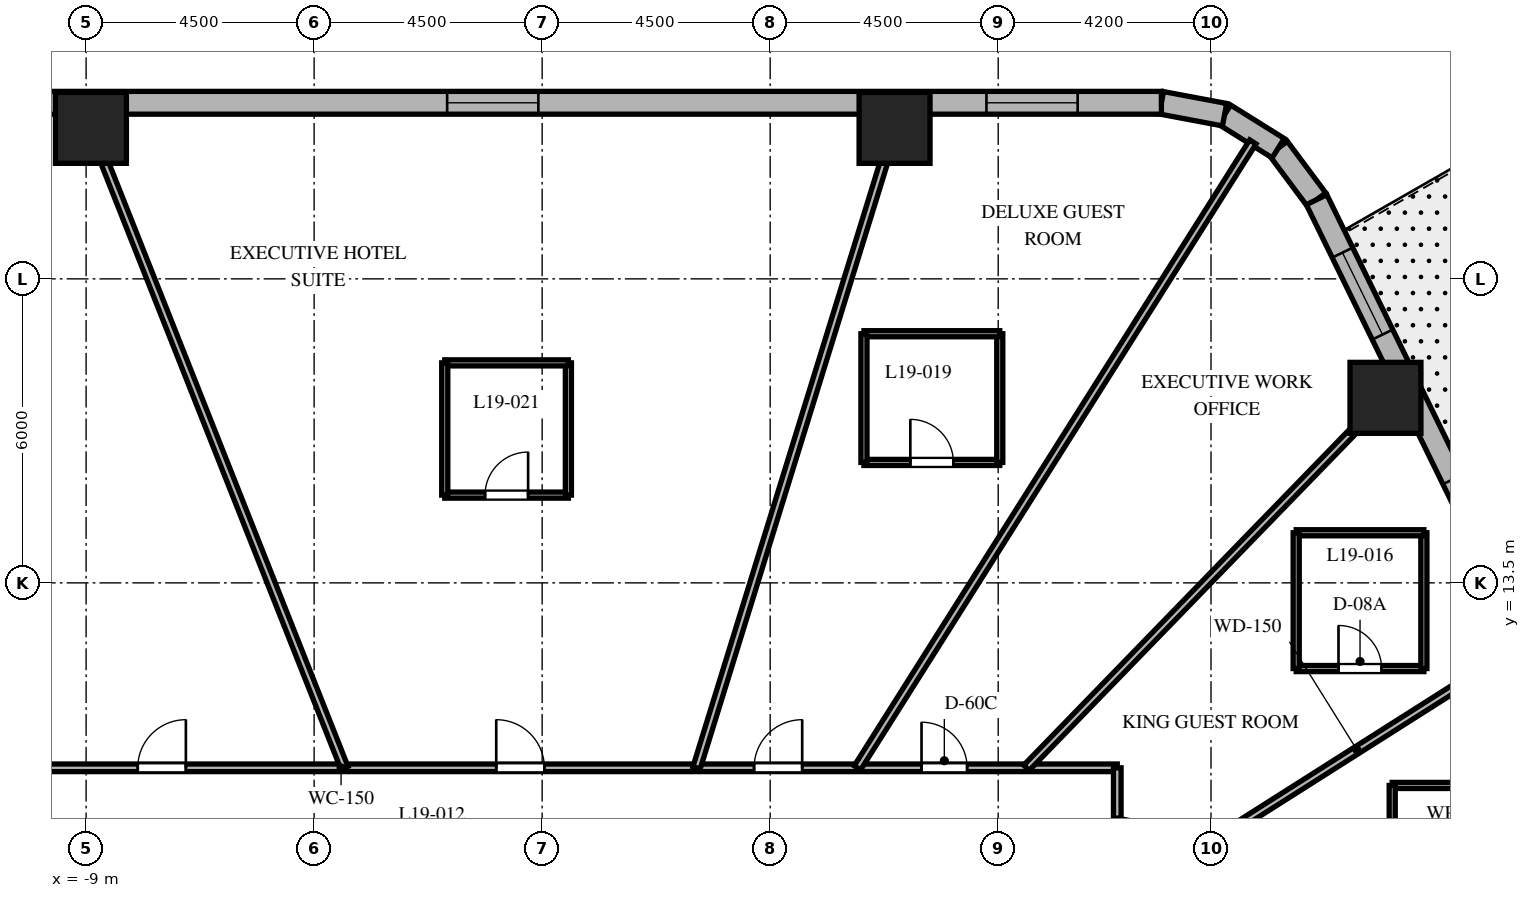
"""IFC4 building model, lengths in metres.
Left out: names, types, materials, properties, quantities, classifications, styles, units other than length and angle.
Written with IfcOpenShell. Run it as: python <this file> out.ifc"""

import sys

from ifc_helpers import new_model, si_unit, direction, frame, frame_2d, origin, origin_2d, place, context, subcontext, project, spatial, rectangle, extrude, element, fill, save


model = new_model("IFC4")
c1 = context("Model", 3, precision=1e-05, world=origin(), true_north=direction((0.0, 1.0)))
c2 = subcontext(c1, "Body", "Model", "MODEL_VIEW")
j1 = project(units=[si_unit("LENGTHUNIT", "METRE"), si_unit("PLANEANGLEUNIT", "RADIAN")], contexts=[c1])
p1 = place(None, origin())
s1 = spatial("IfcSite", under=j1, at=p1, CompositionType="ELEMENT")
p2 = place(p1, origin())
s2 = spatial("IfcBuilding", under=s1, at=p2, CompositionType="ELEMENT")
p3 = place(p2, frame((0.0, 0.0, 82.3)))
s3 = spatial("IfcBuildingStorey", under=s2, at=p3, CompositionType="ELEMENT", Elevation=82.3)
for number, where, z_axis, x_axis in (
    (1, (16.643, 17.152, 0.0), (0.0, 0.0, 1.0), (1.0, 0.0, 0.0)),
    (2, (6.955, 22.48, 0.0), (0.0, 0.0, 1.0), (1.0, 0.0, 0.0)),
    (3, (-8.905, 22.48, 0.0), (0.0, 0.0, 1.0), (1.0, 0.0, 0.0)),
):
    element("IfcColumn", number, at=place(p3, frame(where, z_axis=z_axis, x_axis=x_axis)), inside=s3, PredefinedType="COLUMN", context=c2, shape_type="SweptSolid", body=[
        extrude(rectangle(XDim=1.4, YDim=1.4, at=origin_2d()), origin(), (0.0, 0.0, 1.0), 3.7),
    ])
p4 = place(p3, frame((15.284, 21.062, 0.0), z_axis=(0.0, 0.0, 1.0), x_axis=(-0.597595366449, 0.801797841104, 0.0)))
e4 = element("IfcWall", 4, at=p4, inside=s3, PredefinedType="SOLIDWALL", context=c2, shape_type="SweptSolid", body=[
    extrude(rectangle(XDim=1.269, YDim=0.45, at=frame_2d((0.634, 0.0))), origin(), (0.0, 0.0, 1.0), 3.38),
])
p5 = place(p3, frame((14.526, 22.08, 0.0), z_axis=(0.0, 0.0, 1.0), x_axis=(-0.848185203596, 0.529699783275, 0.0)))
e5 = element("IfcWall", 5, at=p5, inside=s3, PredefinedType="SOLIDWALL", context=c2, shape_type="SweptSolid", body=[
    extrude(rectangle(XDim=1.247, YDim=0.45, at=frame_2d((0.624, 0.0))), origin(), (0.0, 0.0, 1.0), 3.38),
])
p6 = place(p3, frame((13.468, 22.74, 0.0), z_axis=(0.0, 0.0, 1.0), x_axis=(-0.982717174228, 0.185113358451, 0.0)))
e6 = element("IfcWall", 6, at=p6, inside=s3, PredefinedType="SOLIDWALL", context=c2, shape_type="SweptSolid", body=[
    extrude(rectangle(XDim=1.269, YDim=0.45, at=frame_2d((0.634, 0.0))), origin(), (0.0, 0.0, 1.0), 3.38),
])
p7 = place(p3, frame((24.336, 2.532, 0.0), z_axis=(0.0, 0.0, 1.0), x_axis=(-0.438931326393, 0.898520612291, 0.0)))
e7 = element("IfcWall", 7, at=p7, inside=s3, PredefinedType="SOLIDWALL", context=c2, shape_type="SweptSolid", body=[
    extrude(rectangle(XDim=20.623, YDim=0.45, at=frame_2d((10.312, 0.0))), origin(), (0.0, 0.0, 1.0), 3.38),
])
p8 = place(p7, frame((5.171, 0.0, 0.0)))
e8 = element("IfcOpeningElement", 8, at=p8, cuts=e7, PredefinedType="OPENING", context=c2, shape_type="SweptSolid", body=[
    extrude(rectangle(XDim=1.0, YDim=2.15, at=frame_2d((0.5, 1.075))), frame((0.0, 0.235, 0.0), z_axis=(0.0, -1.0, 0.0), x_axis=(1.0, 0.0, 0.0)), (0.0, 0.0, 1.0), 0.47),
])
p9 = place(p7, frame((6.842, 0.0, 0.8)))
e9 = element("IfcOpeningElement", 9, at=p9, cuts=e7, PredefinedType="OPENING", context=c2, shape_type="SweptSolid", body=[
    extrude(rectangle(XDim=1.8, YDim=1.8, at=frame_2d((0.9, 0.9))), frame((0.0, 0.235, 0.0), z_axis=(0.0, -1.0, 0.0), x_axis=(1.0, 0.0, 0.0)), (0.0, 0.0, 1.0), 0.47),
])
p10 = place(p7, frame((12.683, 0.0, 0.8)))
e10 = element("IfcOpeningElement", 10, at=p10, cuts=e7, PredefinedType="OPENING", context=c2, shape_type="SweptSolid", body=[
    extrude(rectangle(XDim=1.8, YDim=1.8, at=frame_2d((0.9, 0.9))), frame((0.0, 0.235, 0.0), z_axis=(0.0, -1.0, 0.0), x_axis=(1.0, 0.0, 0.0)), (0.0, 0.0, 1.0), 0.47),
])
p11 = place(p7, frame((17.66, 0.0, 0.8)))
e11 = element("IfcOpeningElement", 11, at=p11, cuts=e7, PredefinedType="OPENING", context=c2, shape_type="SweptSolid", body=[
    extrude(rectangle(XDim=1.8, YDim=1.8, at=frame_2d((0.9, 0.9))), frame((0.0, 0.235, 0.0), z_axis=(0.0, -1.0, 0.0), x_axis=(1.0, 0.0, 0.0)), (0.0, 0.0, 1.0), 0.47),
])
p12 = place(p7, frame((1.214, 0.0, 0.8)))
e12 = element("IfcOpeningElement", 12, at=p12, cuts=e7, PredefinedType="OPENING", context=c2, shape_type="SweptSolid", body=[
    extrude(rectangle(XDim=1.8, YDim=1.8, at=frame_2d((0.9, 0.9))), frame((0.0, 0.235, 0.0), z_axis=(0.0, -1.0, 0.0), x_axis=(1.0, 0.0, 0.0)), (0.0, 0.0, 1.0), 0.47),
])
p13 = place(p3, frame((12.221, 22.975, 0.0), z_axis=(0.0, 0.0, 1.0), x_axis=(-1.0, 0.0, 0.0)))
e13 = element("IfcWall", 13, at=p13, inside=s3, PredefinedType="SOLIDWALL", context=c2, shape_type="SweptSolid", body=[
    extrude(rectangle(XDim=26.389, YDim=0.45, at=frame_2d((13.195, 0.0))), origin(), (0.0, 0.0, 1.0), 3.38),
])
p14 = place(p13, frame((1.653, 0.0, 0.8)))
e14 = element("IfcOpeningElement", 14, at=p14, cuts=e13, PredefinedType="OPENING", context=c2, shape_type="SweptSolid", body=[
    extrude(rectangle(XDim=1.8, YDim=1.8, at=frame_2d((0.9, 0.9))), frame((0.0, 0.235, 0.0), z_axis=(0.0, -1.0, 0.0), x_axis=(1.0, 0.0, 0.0)), (0.0, 0.0, 1.0), 0.47),
])
p15 = place(p13, frame((12.296, 0.0, 0.8)))
e15 = element("IfcOpeningElement", 15, at=p15, cuts=e13, PredefinedType="OPENING", context=c2, shape_type="SweptSolid", body=[
    extrude(rectangle(XDim=1.8, YDim=1.8, at=frame_2d((0.9, 0.9))), frame((0.0, 0.235, 0.0), z_axis=(0.0, -1.0, 0.0), x_axis=(1.0, 0.0, 0.0)), (0.0, 0.0, 1.0), 0.47),
])
p16 = place(p13, frame((22.938, 0.0, 0.8)))
e16 = element("IfcOpeningElement", 16, at=p16, cuts=e13, PredefinedType="OPENING", context=c2, shape_type="SweptSolid", body=[
    extrude(rectangle(XDim=1.8, YDim=1.8, at=frame_2d((0.9, 0.9))), frame((0.0, 0.235, 0.0), z_axis=(0.0, -1.0, 0.0), x_axis=(1.0, 0.0, 0.0)), (0.0, 0.0, 1.0), 0.47),
])
p17 = place(p3, frame((-11.35, 9.85, 0.0), z_axis=(0.0, 0.0, 1.0), x_axis=(1.0, 0.0, 0.0)))
e17 = element("IfcWall", 17, at=p17, inside=s3, PredefinedType="PARTITIONING", context=c2, shape_type="SweptSolid", body=[
    extrude(rectangle(XDim=22.7, YDim=0.15, at=frame_2d((11.35, 0.0))), origin(), (0.0, 0.0, 1.0), 2.82),
])
p18 = place(p17, frame((18.837, 0.0, 0.0)))
e18 = element("IfcOpeningElement", 18, at=p18, cuts=e17, PredefinedType="OPENING", context=c2, shape_type="SweptSolid", body=[
    extrude(rectangle(XDim=0.9, YDim=2.03, at=frame_2d((0.45, 1.015))), frame((0.0, 0.085, 0.0), z_axis=(0.0, -1.0, 0.0), x_axis=(1.0, 0.0, 0.0)), (0.0, 0.0, 1.0), 0.17),
])
p19 = place(p17, frame((15.532, 0.0, 0.0)))
e19 = element("IfcOpeningElement", 19, at=p19, cuts=e17, PredefinedType="OPENING", context=c2, shape_type="SweptSolid", body=[
    extrude(rectangle(XDim=0.95, YDim=2.03, at=frame_2d((0.475, 1.015))), frame((0.0, 0.085, 0.0), z_axis=(0.0, -1.0, 0.0), x_axis=(1.0, 0.0, 0.0)), (0.0, 0.0, 1.0), 0.17),
])
p20 = place(p17, frame((10.444, 0.0, 0.0)))
e20 = element("IfcOpeningElement", 20, at=p20, cuts=e17, PredefinedType="OPENING", context=c2, shape_type="SweptSolid", body=[
    extrude(rectangle(XDim=0.95, YDim=2.03, at=frame_2d((0.475, 1.015))), frame((0.0, 0.085, 0.0), z_axis=(0.0, -1.0, 0.0), x_axis=(1.0, 0.0, 0.0)), (0.0, 0.0, 1.0), 0.17),
])
p21 = place(p17, frame((3.369, 0.0, 0.0)))
e21 = element("IfcOpeningElement", 21, at=p21, cuts=e17, PredefinedType="OPENING", context=c2, shape_type="SweptSolid", body=[
    extrude(rectangle(XDim=0.95, YDim=2.03, at=frame_2d((0.475, 1.015))), frame((0.0, 0.085, 0.0), z_axis=(0.0, -1.0, 0.0), x_axis=(1.0, 0.0, 0.0)), (0.0, 0.0, 1.0), 0.17),
])
p22 = place(p3, frame((11.35, 9.85, 0.0), z_axis=(0.0, 0.0, 1.0), x_axis=(0.0, -1.0, 0.0)))
e22 = element("IfcWall", 22, at=p22, inside=s3, PredefinedType="PARTITIONING", context=c2, shape_type="SweptSolid", body=[
    extrude(rectangle(XDim=19.7, YDim=0.15, at=frame_2d((9.85, 0.0))), origin(), (0.0, 0.0, 1.0), 2.82),
])
p23 = place(p22, frame((4.208, 0.0, 0.0)))
e23 = element("IfcOpeningElement", 23, at=p23, cuts=e22, PredefinedType="OPENING", context=c2, shape_type="SweptSolid", body=[
    extrude(rectangle(XDim=0.95, YDim=2.03, at=frame_2d((0.475, 1.015))), frame((0.0, 0.085, 0.0), z_axis=(0.0, -1.0, 0.0), x_axis=(1.0, 0.0, 0.0)), (0.0, 0.0, 1.0), 0.17),
])
p24 = place(p22, frame((0.97, 0.0, 0.0)))
e24 = element("IfcOpeningElement", 24, at=p24, cuts=e22, PredefinedType="OPENING", context=c2, shape_type="SweptSolid", body=[
    extrude(rectangle(XDim=0.95, YDim=2.03, at=frame_2d((0.475, 1.015))), frame((0.0, 0.085, 0.0), z_axis=(0.0, -1.0, 0.0), x_axis=(1.0, 0.0, 0.0)), (0.0, 0.0, 1.0), 0.17),
])
p25 = place(p22, frame((17.181, 0.0, 0.0)))
e25 = element("IfcOpeningElement", 25, at=p25, cuts=e22, PredefinedType="OPENING", context=c2, shape_type="SweptSolid", body=[
    extrude(rectangle(XDim=0.95, YDim=2.03, at=frame_2d((0.475, 1.015))), frame((0.0, 0.085, 0.0), z_axis=(0.0, -1.0, 0.0), x_axis=(1.0, 0.0, 0.0)), (0.0, 0.0, 1.0), 0.17),
])
p26 = place(p22, frame((13.403, 0.0, 0.0)))
e26 = element("IfcOpeningElement", 26, at=p26, cuts=e22, PredefinedType="OPENING", context=c2, shape_type="SweptSolid", body=[
    extrude(rectangle(XDim=0.95, YDim=2.03, at=frame_2d((0.475, 1.015))), frame((0.0, 0.085, 0.0), z_axis=(0.0, -1.0, 0.0), x_axis=(1.0, 0.0, 0.0)), (0.0, 0.0, 1.0), 0.17),
])
p27 = place(p22, frame((8.838, 0.0, 0.0)))
e27 = element("IfcOpeningElement", 27, at=p27, cuts=e22, PredefinedType="OPENING", context=c2, shape_type="SweptSolid", body=[
    extrude(rectangle(XDim=0.95, YDim=2.03, at=frame_2d((0.475, 1.015))), frame((0.0, 0.085, 0.0), z_axis=(0.0, -1.0, 0.0), x_axis=(1.0, 0.0, 0.0)), (0.0, 0.0, 1.0), 0.17),
])
p28 = place(p3, frame((11.35, 7.199, 0.0), z_axis=(0.0, 0.0, 1.0), x_axis=(0.844458213289, 0.535621439087, 0.0)))
e28 = element("IfcWall", 28, at=p28, inside=s3, PredefinedType="PARTITIONING", context=c2, shape_type="SweptSolid", body=[
    extrude(rectangle(XDim=9.679, YDim=0.15, at=frame_2d((4.84, 0.0))), origin(), (0.0, 0.0, 1.0), 2.52),
])
p29 = place(p3, frame((9.558, 9.85, 0.0), z_axis=(0.0, 0.0, 1.0), x_axis=(0.69638346089, 0.717669893056, 0.0)))
e29 = element("IfcWall", 29, at=p29, inside=s3, PredefinedType="PARTITIONING", context=c2, shape_type="SweptSolid", body=[
    extrude(rectangle(XDim=10.701, YDim=0.15, at=frame_2d((5.351, 0.0))), origin(), (0.0, 0.0, 1.0), 2.52),
])
p30 = place(p3, frame((6.222, 9.85, 0.0), z_axis=(0.0, 0.0, 1.0), x_axis=(0.534069056435, 0.845440857162, 0.0)))
e30 = element("IfcWall", 30, at=p30, inside=s3, PredefinedType="PARTITIONING", context=c2, shape_type="SweptSolid", body=[
    extrude(rectangle(XDim=14.611, YDim=0.15, at=frame_2d((7.306, 0.0))), origin(), (0.0, 0.0, 1.0), 2.52),
])
p31 = place(p3, frame((3.048, 9.85, 0.0), z_axis=(0.0, 0.0, 1.0), x_axis=(0.295553992761, 0.955326037206, 0.0)))
e31 = element("IfcWall", 31, at=p31, inside=s3, PredefinedType="PARTITIONING", context=c2, shape_type="SweptSolid", body=[
    extrude(rectangle(XDim=13.739, YDim=0.15, at=frame_2d((6.869, 0.0))), origin(), (0.0, 0.0, 1.0), 2.52),
])
p32 = place(p3, frame((-3.902, 9.85, 0.0), z_axis=(0.0, 0.0, 1.0), x_axis=(-0.36828765711, 0.929711891728, 0.0)))
e32 = element("IfcWall", 32, at=p32, inside=s3, PredefinedType="PARTITIONING", context=c2, shape_type="SweptSolid", body=[
    extrude(rectangle(XDim=14.117, YDim=0.15, at=frame_2d((7.059, 0.0))), origin(), (0.0, 0.0, 1.0), 2.52),
])
p33 = place(p3, frame((19.216, 9.502, 0.0), z_axis=(0.0, 0.0, 1.0), x_axis=(-1.0, 0.0, 0.0)))
e33 = element("IfcWall", 33, at=p33, inside=s3, PredefinedType="PARTITIONING", context=c2, shape_type="SweptSolid", body=[
    extrude(rectangle(XDim=2.44, YDim=0.12, at=frame_2d((1.22, 0.0))), origin(), (0.0, 0.0, 1.0), 3.38),
])
p34 = place(p3, frame((16.776, 9.502, 0.0), z_axis=(0.0, 0.0, 1.0), x_axis=(0.0, -1.0, 0.0)))
e34 = element("IfcWall", 34, at=p34, inside=s3, PredefinedType="PARTITIONING", context=c2, shape_type="SweptSolid", body=[
    extrude(rectangle(XDim=2.61, YDim=0.12, at=frame_2d((1.305, 0.0))), origin(), (0.0, 0.0, 1.0), 2.906),
])
p35 = place(p3, frame((14.881, 11.809, 0.0), z_axis=(0.0, 0.0, 1.0), x_axis=(1.0, 0.0, 0.0)))
e35 = element("IfcWall", 35, at=p35, inside=s3, PredefinedType="PARTITIONING", context=c2, shape_type="SweptSolid", body=[
    extrude(rectangle(XDim=2.52, YDim=0.12, at=frame_2d((1.26, 0.0))), origin(), (0.0, 0.0, 1.0), 2.906),
])
p36 = place(p35, frame((0.835, 0.0, 0.0)))
e36 = element("IfcOpeningElement", 36, at=p36, cuts=e35, PredefinedType="OPENING", context=c2, shape_type="SweptSolid", body=[
    extrude(rectangle(XDim=0.85, YDim=2.03, at=frame_2d((0.425, 1.015))), frame((0.0, 0.07, 0.0), z_axis=(0.0, -1.0, 0.0), x_axis=(1.0, 0.0, 0.0)), (0.0, 0.0, 1.0), 0.14),
])
p37 = place(p3, frame((17.401, 11.809, 0.0), z_axis=(0.0, 0.0, 1.0), x_axis=(0.0, 1.0, 0.0)))
e37 = element("IfcWall", 37, at=p37, inside=s3, PredefinedType="PARTITIONING", context=c2, shape_type="SweptSolid", body=[
    extrude(rectangle(XDim=2.68, YDim=0.12, at=frame_2d((1.34, 0.0))), origin(), (0.0, 0.0, 1.0), 3.38),
])
p38 = place(p3, frame((17.401, 14.489, 0.0), z_axis=(0.0, 0.0, 1.0), x_axis=(-1.0, 0.0, 0.0)))
e38 = element("IfcWall", 38, at=p38, inside=s3, PredefinedType="PARTITIONING", context=c2, shape_type="SweptSolid", body=[
    extrude(rectangle(XDim=2.52, YDim=0.12, at=frame_2d((1.26, 0.0))), origin(), (0.0, 0.0, 1.0), 3.38),
])
p39 = place(p3, frame((14.881, 14.489, 0.0), z_axis=(0.0, 0.0, 1.0), x_axis=(0.0, -1.0, 0.0)))
e39 = element("IfcWall", 39, at=p39, inside=s3, PredefinedType="PARTITIONING", context=c2, shape_type="SweptSolid", body=[
    extrude(rectangle(XDim=2.68, YDim=0.12, at=frame_2d((1.34, 0.0))), origin(), (0.0, 0.0, 1.0), 2.906),
])
p40 = place(p3, frame((6.351, 15.877, 0.0), z_axis=(0.0, 0.0, 1.0), x_axis=(1.0, 0.0, 0.0)))
e40 = element("IfcWall", 40, at=p40, inside=s3, PredefinedType="PARTITIONING", context=c2, shape_type="SweptSolid", body=[
    extrude(rectangle(XDim=2.68, YDim=0.12, at=frame_2d((1.34, 0.0))), origin(), (0.0, 0.0, 1.0), 2.82),
])
p41 = place(p40, frame((0.915, 0.0, 0.0)))
e41 = element("IfcOpeningElement", 41, at=p41, cuts=e40, PredefinedType="OPENING", context=c2, shape_type="SweptSolid", body=[
    extrude(rectangle(XDim=0.85, YDim=2.03, at=frame_2d((0.425, 1.015))), frame((0.0, 0.07, 0.0), z_axis=(0.0, -1.0, 0.0), x_axis=(1.0, 0.0, 0.0)), (0.0, 0.0, 1.0), 0.14),
])
p42 = place(p3, frame((9.031, 15.877, 0.0), z_axis=(0.0, 0.0, 1.0), x_axis=(0.0, 1.0, 0.0)))
e42 = element("IfcWall", 42, at=p42, inside=s3, PredefinedType="PARTITIONING", context=c2, shape_type="SweptSolid", body=[
    extrude(rectangle(XDim=2.54, YDim=0.12, at=frame_2d((1.27, 0.0))), origin(), (0.0, 0.0, 1.0), 2.952),
])
p43 = place(p3, frame((9.031, 18.417, 0.0), z_axis=(0.0, 0.0, 1.0), x_axis=(-1.0, 0.0, 0.0)))
e43 = element("IfcWall", 43, at=p43, inside=s3, PredefinedType="PARTITIONING", context=c2, shape_type="SweptSolid", body=[
    extrude(rectangle(XDim=2.68, YDim=0.12, at=frame_2d((1.34, 0.0))), origin(), (0.0, 0.0, 1.0), 2.82),
])
p44 = place(p3, frame((6.351, 18.417, 0.0), z_axis=(0.0, 0.0, 1.0), x_axis=(0.0, -1.0, 0.0)))
e44 = element("IfcWall", 44, at=p44, inside=s3, PredefinedType="PARTITIONING", context=c2, shape_type="SweptSolid", body=[
    extrude(rectangle(XDim=2.54, YDim=0.12, at=frame_2d((1.27, 0.0))), origin(), (0.0, 0.0, 1.0), 2.82),
])
p45 = place(p3, frame((-1.922, 15.232, 0.0), z_axis=(0.0, 0.0, 1.0), x_axis=(1.0, 0.0, 0.0)))
e45 = element("IfcWall", 45, at=p45, inside=s3, PredefinedType="PARTITIONING", context=c2, shape_type="SweptSolid", body=[
    extrude(rectangle(XDim=2.44, YDim=0.12, at=frame_2d((1.22, 0.0))), origin(), (0.0, 0.0, 1.0), 3.38),
])
p46 = place(p45, frame((0.795, 0.0, 0.0)))
e46 = element("IfcOpeningElement", 46, at=p46, cuts=e45, PredefinedType="OPENING", context=c2, shape_type="SweptSolid", body=[
    extrude(rectangle(XDim=0.85, YDim=2.03, at=frame_2d((0.425, 1.015))), frame((0.0, 0.07, 0.0), z_axis=(0.0, -1.0, 0.0), x_axis=(1.0, 0.0, 0.0)), (0.0, 0.0, 1.0), 0.14),
])
p47 = place(p3, frame((0.518, 15.232, 0.0), z_axis=(0.0, 0.0, 1.0), x_axis=(0.0, 1.0, 0.0)))
e47 = element("IfcWall", 47, at=p47, inside=s3, PredefinedType="PARTITIONING", context=c2, shape_type="SweptSolid", body=[
    extrude(rectangle(XDim=2.61, YDim=0.12, at=frame_2d((1.305, 0.0))), origin(), (0.0, 0.0, 1.0), 2.82),
])
p48 = place(p3, frame((0.518, 17.842, 0.0), z_axis=(0.0, 0.0, 1.0), x_axis=(-1.0, 0.0, 0.0)))
e48 = element("IfcWall", 48, at=p48, inside=s3, PredefinedType="PARTITIONING", context=c2, shape_type="SweptSolid", body=[
    extrude(rectangle(XDim=2.44, YDim=0.12, at=frame_2d((1.22, 0.0))), origin(), (0.0, 0.0, 1.0), 2.82),
])
p49 = place(p3, frame((-1.922, 17.842, 0.0), z_axis=(0.0, 0.0, 1.0), x_axis=(0.0, -1.0, 0.0)))
e49 = element("IfcWall", 49, at=p49, inside=s3, PredefinedType="PARTITIONING", context=c2, shape_type="SweptSolid", body=[
    extrude(rectangle(XDim=2.61, YDim=0.12, at=frame_2d((1.305, 0.0))), origin(), (0.0, 0.0, 1.0), 2.82),
])
p50 = place(p11, origin())
e50 = element("IfcWindow", 50, at=p50, inside=s3, PartitioningType="SINGLE_PANEL", PredefinedType="WINDOW", context=c2, shape_type="SweptSolid", body=[
    extrude(rectangle(XDim=1.8, YDim=1.8, at=frame_2d((0.9, 0.9))), frame((0.0, 0.03, 0.0), z_axis=(0.0, -1.0, 0.0), x_axis=(1.0, 0.0, 0.0)), (0.0, 0.0, 1.0), 0.06),
])
fill(e11, e50)
p51 = place(p14, origin())
e51 = element("IfcWindow", 51, at=p51, inside=s3, PartitioningType="SINGLE_PANEL", PredefinedType="WINDOW", context=c2, shape_type="SweptSolid", body=[
    extrude(rectangle(XDim=1.8, YDim=1.8, at=frame_2d((0.9, 0.9))), frame((0.0, 0.03, 0.0), z_axis=(0.0, -1.0, 0.0), x_axis=(1.0, 0.0, 0.0)), (0.0, 0.0, 1.0), 0.06),
])
fill(e14, e51)
p52 = place(p15, origin())
e52 = element("IfcWindow", 52, at=p52, inside=s3, PartitioningType="SINGLE_PANEL", PredefinedType="WINDOW", context=c2, shape_type="SweptSolid", body=[
    extrude(rectangle(XDim=1.8, YDim=1.8, at=frame_2d((0.9, 0.9))), frame((0.0, 0.03, 0.0), z_axis=(0.0, -1.0, 0.0), x_axis=(1.0, 0.0, 0.0)), (0.0, 0.0, 1.0), 0.06),
])
fill(e15, e52)
p53 = place(p24, origin())
e53 = element("IfcDoor", 53, at=p53, inside=s3, OperationType="SINGLE_SWING_RIGHT", PredefinedType="DOOR", context=c2, shape_type="SweptSolid", body=[
    extrude(rectangle(XDim=0.95, YDim=2.03, at=frame_2d((0.475, 1.015))), frame((0.0, 0.025, 0.0), z_axis=(0.0, -1.0, 0.0), x_axis=(1.0, 0.0, 0.0)), (0.0, 0.0, 1.0), 0.05),
])
fill(e24, e53)
p54 = place(p36, origin())
e54 = element("IfcDoor", 54, at=p54, inside=s3, OperationType="SINGLE_SWING_LEFT", PredefinedType="DOOR", context=c2, shape_type="SweptSolid", body=[
    extrude(rectangle(XDim=0.85, YDim=2.03, at=frame_2d((0.425, 1.015))), frame((0.0, 0.025, 0.0), z_axis=(0.0, -1.0, 0.0), x_axis=(1.0, 0.0, 0.0)), (0.0, 0.0, 1.0), 0.05),
])
fill(e36, e54)
p55 = place(p18, origin())
e55 = element("IfcDoor", 55, at=p55, inside=s3, OperationType="SINGLE_SWING_LEFT", PredefinedType="DOOR", context=c2, shape_type="SweptSolid", body=[
    extrude(rectangle(XDim=0.9, YDim=2.03, at=frame_2d((0.45, 1.015))), frame((0.0, 0.025, 0.0), z_axis=(0.0, -1.0, 0.0), x_axis=(1.0, 0.0, 0.0)), (0.0, 0.0, 1.0), 0.05),
])
fill(e18, e55)
p56 = place(p19, origin())
e56 = element("IfcDoor", 56, at=p56, inside=s3, OperationType="SINGLE_SWING_RIGHT", PredefinedType="DOOR", context=c2, shape_type="SweptSolid", body=[
    extrude(rectangle(XDim=0.95, YDim=2.03, at=frame_2d((0.475, 1.015))), frame((0.0, 0.025, 0.0), z_axis=(0.0, -1.0, 0.0), x_axis=(1.0, 0.0, 0.0)), (0.0, 0.0, 1.0), 0.05),
])
fill(e19, e56)
p57 = place(p41, origin())
e57 = element("IfcDoor", 57, at=p57, inside=s3, OperationType="SINGLE_SWING_LEFT", PredefinedType="DOOR", context=c2, shape_type="SweptSolid", body=[
    extrude(rectangle(XDim=0.85, YDim=2.03, at=frame_2d((0.425, 1.015))), frame((0.0, 0.025, 0.0), z_axis=(0.0, -1.0, 0.0), x_axis=(1.0, 0.0, 0.0)), (0.0, 0.0, 1.0), 0.05),
])
fill(e41, e57)
p58 = place(p20, origin())
e58 = element("IfcDoor", 58, at=p58, inside=s3, OperationType="SINGLE_SWING_LEFT", PredefinedType="DOOR", context=c2, shape_type="SweptSolid", body=[
    extrude(rectangle(XDim=0.95, YDim=2.03, at=frame_2d((0.475, 1.015))), frame((0.0, 0.025, 0.0), z_axis=(0.0, -1.0, 0.0), x_axis=(1.0, 0.0, 0.0)), (0.0, 0.0, 1.0), 0.05),
])
fill(e20, e58)
p59 = place(p46, origin())
e59 = element("IfcDoor", 59, at=p59, inside=s3, OperationType="SINGLE_SWING_RIGHT", PredefinedType="DOOR", context=c2, shape_type="SweptSolid", body=[
    extrude(rectangle(XDim=0.85, YDim=2.03, at=frame_2d((0.425, 1.015))), frame((0.0, 0.025, 0.0), z_axis=(0.0, -1.0, 0.0), x_axis=(1.0, 0.0, 0.0)), (0.0, 0.0, 1.0), 0.05),
])
fill(e46, e59)
p60 = place(p21, origin())
e60 = element("IfcDoor", 60, at=p60, inside=s3, OperationType="SINGLE_SWING_RIGHT", PredefinedType="DOOR", context=c2, shape_type="SweptSolid", body=[
    extrude(rectangle(XDim=0.95, YDim=2.03, at=frame_2d((0.475, 1.015))), frame((0.0, 0.025, 0.0), z_axis=(0.0, -1.0, 0.0), x_axis=(1.0, 0.0, 0.0)), (0.0, 0.0, 1.0), 0.05),
])
fill(e21, e60)
save(model, sys.argv[1])
